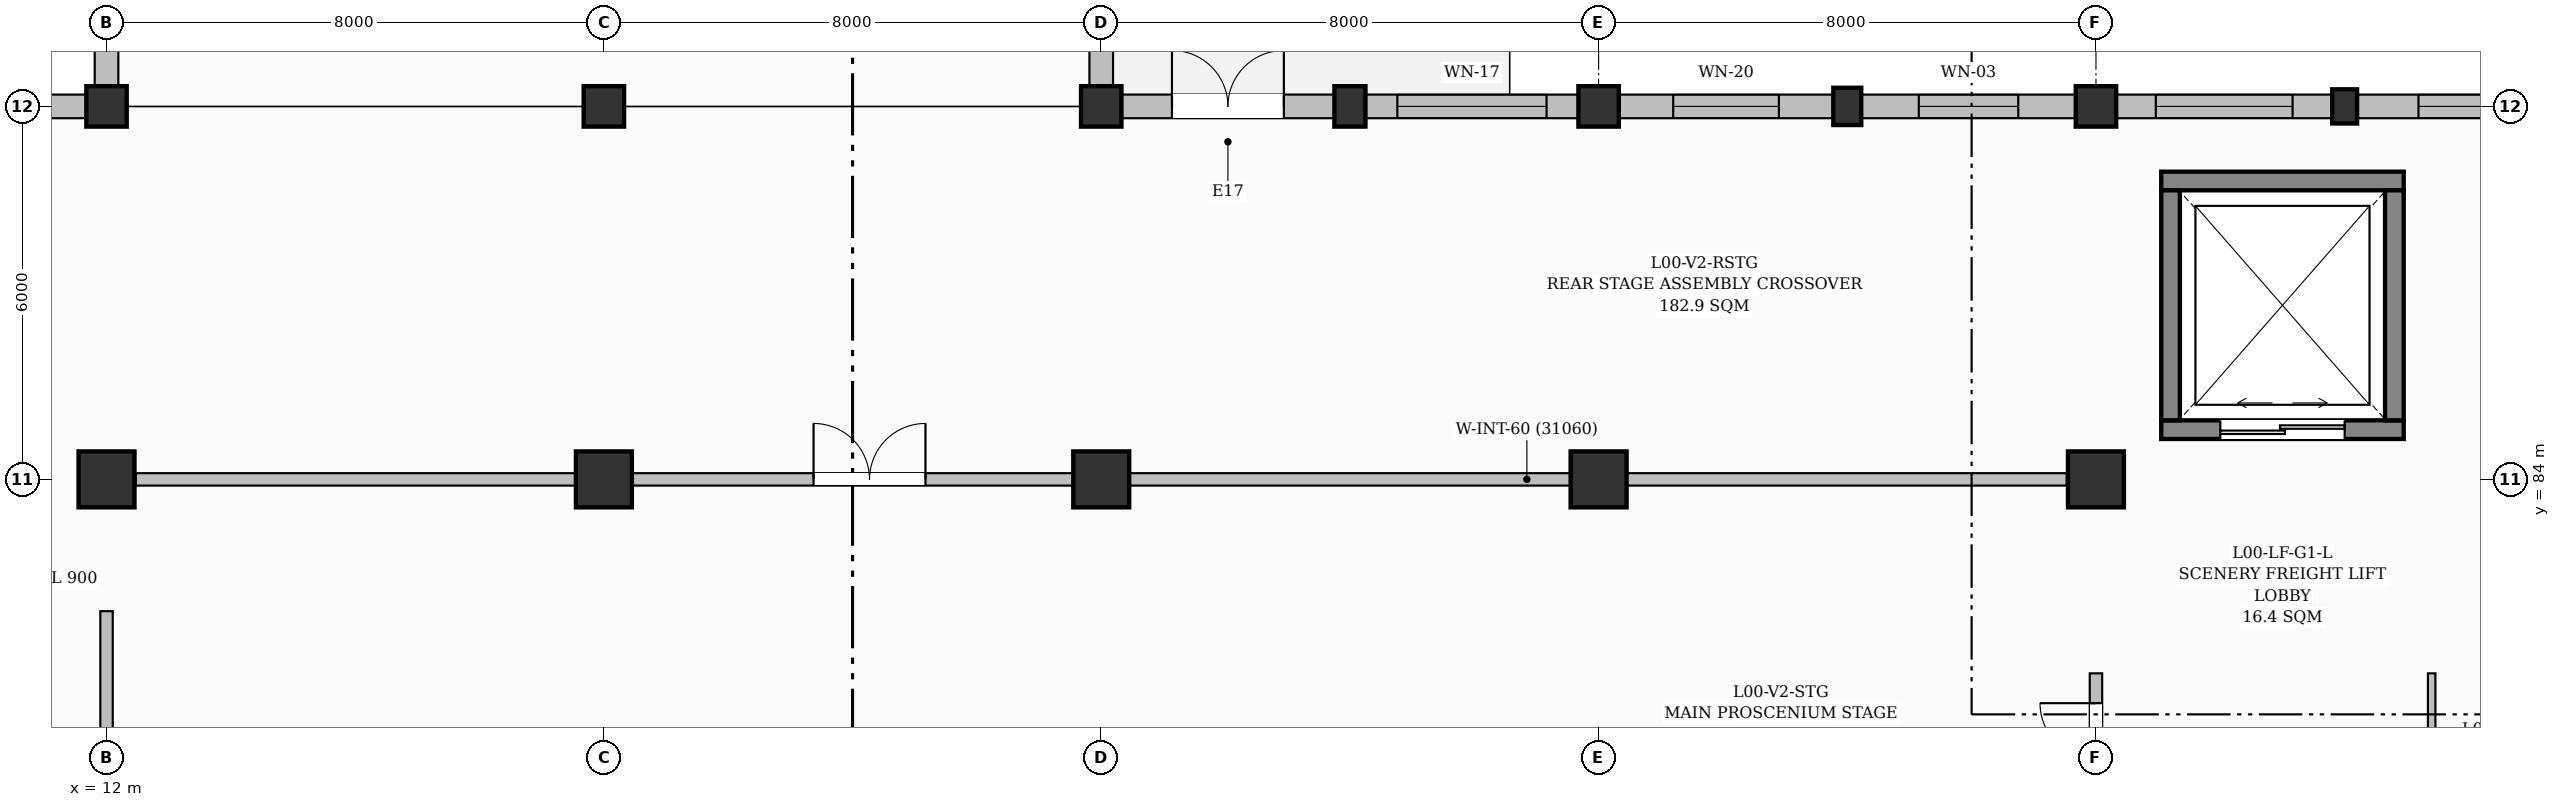
"""IFC4 building model, lengths in metres.
Left out: names, types, materials, properties, quantities, classifications, styles, units other than length and angle.
Written with IfcOpenShell. Run it as: python <this file> out.ifc"""

import sys

from ifc_helpers import new_model, si_unit, direction, frame, frame_2d, origin, origin_2d, place, context, subcontext, project, spatial, rectangle, extrude, element, fill, save


model = new_model("IFC4")
c1 = context("Model", 3, precision=1e-05, world=origin(), true_north=direction((0.0, 1.0)))
c2 = subcontext(c1, "Body", "Model", "MODEL_VIEW")
j1 = project(units=[si_unit("LENGTHUNIT", "METRE"), si_unit("PLANEANGLEUNIT", "RADIAN")], contexts=[c1])
p1 = place(None, origin())
s1 = spatial("IfcSite", under=j1, at=p1, CompositionType="ELEMENT")
p2 = place(p1, origin())
s2 = spatial("IfcBuilding", under=s1, at=p2, CompositionType="ELEMENT")
p3 = place(p2, origin())
s3 = spatial("IfcBuildingStorey", under=s2, at=p3, CompositionType="ELEMENT", Elevation=0.0)
p4 = place(p3, frame((12.0, 84.0, 0.0), z_axis=(0.0, 0.0, 1.0), x_axis=(1.0, 0.0, 0.0)))
e1 = element("IfcColumn", 1, at=p4, inside=s3, PredefinedType="COLUMN", context=c2, shape_type="SweptSolid", body=[
    extrude(rectangle(XDim=0.9, YDim=0.9, at=origin_2d()), origin(), (0.0, 0.0, 1.0), 4.8),
])
p5 = place(p3, frame((12.0, 90.0, 0.0), z_axis=(0.0, 0.0, 1.0), x_axis=(1.0, 0.0, 0.0)))
e2 = element("IfcColumn", 2, at=p5, inside=s3, PredefinedType="COLUMN", context=c2, shape_type="SweptSolid", body=[
    extrude(rectangle(XDim=0.65, YDim=0.65, at=origin_2d()), origin(), (0.0, 0.0, 1.0), 4.8),
])
p6 = place(p3, frame((20.0, 84.0, 0.0), z_axis=(0.0, 0.0, 1.0), x_axis=(1.0, 0.0, 0.0)))
e3 = element("IfcColumn", 3, at=p6, inside=s3, PredefinedType="COLUMN", context=c2, shape_type="SweptSolid", body=[
    extrude(rectangle(XDim=0.9, YDim=0.9, at=origin_2d()), origin(), (0.0, 0.0, 1.0), 4.8),
])
p7 = place(p3, frame((20.0, 90.0, 0.0), z_axis=(0.0, 0.0, 1.0), x_axis=(1.0, 0.0, 0.0)))
e4 = element("IfcColumn", 4, at=p7, inside=s3, PredefinedType="COLUMN", context=c2, shape_type="SweptSolid", body=[
    extrude(rectangle(XDim=0.65, YDim=0.65, at=origin_2d()), origin(), (0.0, 0.0, 1.0), 4.8),
])
p8 = place(p3, frame((28.0, 84.0, 0.0), z_axis=(0.0, 0.0, 1.0), x_axis=(1.0, 0.0, 0.0)))
e5 = element("IfcColumn", 5, at=p8, inside=s3, PredefinedType="COLUMN", context=c2, shape_type="SweptSolid", body=[
    extrude(rectangle(XDim=0.9, YDim=0.9, at=origin_2d()), origin(), (0.0, 0.0, 1.0), 4.8),
])
p9 = place(p3, frame((28.0, 90.0, 0.0), z_axis=(0.0, 0.0, 1.0), x_axis=(1.0, 0.0, 0.0)))
e6 = element("IfcColumn", 6, at=p9, inside=s3, PredefinedType="COLUMN", context=c2, shape_type="SweptSolid", body=[
    extrude(rectangle(XDim=0.65, YDim=0.65, at=origin_2d()), origin(), (0.0, 0.0, 1.0), 4.8),
])
p10 = place(p3, frame((32.0, 90.0, 0.0), z_axis=(0.0, 0.0, 1.0), x_axis=(1.0, 0.0, 0.0)))
e7 = element("IfcColumn", 7, at=p10, inside=s3, PredefinedType="PILASTER", context=c2, shape_type="SweptSolid", body=[
    extrude(rectangle(XDim=0.5, YDim=0.65, at=origin_2d()), origin(), (0.0, 0.0, 1.0), 4.8),
])
p11 = place(p3, frame((36.0, 84.0, 0.0), z_axis=(0.0, 0.0, 1.0), x_axis=(1.0, 0.0, 0.0)))
e8 = element("IfcColumn", 8, at=p11, inside=s3, PredefinedType="COLUMN", context=c2, shape_type="SweptSolid", body=[
    extrude(rectangle(XDim=0.9, YDim=0.9, at=origin_2d()), origin(), (0.0, 0.0, 1.0), 4.8),
])
p12 = place(p3, frame((36.0, 90.0, 0.0), z_axis=(0.0, 0.0, 1.0), x_axis=(1.0, 0.0, 0.0)))
e9 = element("IfcColumn", 9, at=p12, inside=s3, PredefinedType="COLUMN", context=c2, shape_type="SweptSolid", body=[
    extrude(rectangle(XDim=0.65, YDim=0.65, at=origin_2d()), origin(), (0.0, 0.0, 1.0), 4.8),
])
p13 = place(p3, frame((40.0, 90.0, 0.0), z_axis=(0.0, 0.0, 1.0), x_axis=(1.0, 0.0, 0.0)))
e10 = element("IfcColumn", 10, at=p13, inside=s3, PredefinedType="PILASTER", context=c2, shape_type="SweptSolid", body=[
    extrude(rectangle(XDim=0.45, YDim=0.6, at=origin_2d()), origin(), (0.0, 0.0, 1.0), 4.8),
])
p14 = place(p3, frame((44.0, 84.0, 0.0), z_axis=(0.0, 0.0, 1.0), x_axis=(1.0, 0.0, 0.0)))
e11 = element("IfcColumn", 11, at=p14, inside=s3, PredefinedType="COLUMN", context=c2, shape_type="SweptSolid", body=[
    extrude(rectangle(XDim=0.9, YDim=0.9, at=origin_2d()), origin(), (0.0, 0.0, 1.0), 4.8),
])
p15 = place(p3, frame((44.0, 90.0, 0.0), z_axis=(0.0, 0.0, 1.0), x_axis=(1.0, 0.0, 0.0)))
e12 = element("IfcColumn", 12, at=p15, inside=s3, PredefinedType="COLUMN", context=c2, shape_type="SweptSolid", body=[
    extrude(rectangle(XDim=0.65, YDim=0.65, at=origin_2d()), origin(), (0.0, 0.0, 1.0), 4.8),
])
p16 = place(p3, frame((48.0, 90.0, 0.0), z_axis=(0.0, 0.0, 1.0), x_axis=(1.0, 0.0, 0.0)))
e13 = element("IfcColumn", 13, at=p16, inside=s3, PredefinedType="PILASTER", context=c2, shape_type="SweptSolid", body=[
    extrude(rectangle(XDim=0.4, YDim=0.55, at=origin_2d()), origin(), (0.0, 0.0, 1.0), 4.8),
])
p17 = place(p3, frame((8.25, 90.0, 0.0), z_axis=(0.0, 0.0, 1.0), x_axis=(1.0, 0.0, 0.0)))
e14 = element("IfcWall", 14, at=p17, inside=s3, PredefinedType="SOLIDWALL", context=c2, shape_type="SweptSolid", body=[
    extrude(rectangle(XDim=3.425, YDim=0.38, at=frame_2d((1.712, 0.0))), origin(), (0.0, 0.0, 1.0), 4.235),
])
p18 = place(p17, frame((0.663, 0.0, 0.95)))
e15 = element("IfcOpeningElement", 15, at=p18, cuts=e14, PredefinedType="OPENING", context=c2, shape_type="SweptSolid", body=[
    extrude(rectangle(XDim=2.1, YDim=1.5, at=frame_2d((1.05, 0.75))), frame((0.0, 0.2, 0.0), z_axis=(0.0, -1.0, 0.0), x_axis=(1.0, 0.0, 0.0)), (0.0, 0.0, 1.0), 0.4),
])
p19 = place(p3, frame((28.325, 90.0, 0.0), z_axis=(0.0, 0.0, 1.0), x_axis=(1.0, 0.0, 0.0)))
e16 = element("IfcWall", 16, at=p19, inside=s3, PredefinedType="SOLIDWALL", context=c2, shape_type="SweptSolid", body=[
    extrude(rectangle(XDim=3.425, YDim=0.38, at=frame_2d((1.712, 0.0))), origin(), (0.0, 0.0, 1.0), 3.935),
])
p20 = place(p19, frame((0.812, 0.0, 0.0)))
e17 = element("IfcOpeningElement", 17, at=p20, cuts=e16, PredefinedType="OPENING", context=c2, shape_type="SweptSolid", body=[
    extrude(rectangle(XDim=1.8, YDim=2.25, at=frame_2d((0.9, 1.125))), frame((0.0, 0.2, 0.0), z_axis=(0.0, -1.0, 0.0), x_axis=(1.0, 0.0, 0.0)), (0.0, 0.0, 1.0), 0.4),
])
p21 = place(p3, frame((32.25, 90.0, 0.0), z_axis=(0.0, 0.0, 1.0), x_axis=(1.0, 0.0, 0.0)))
e18 = element("IfcWall", 18, at=p21, inside=s3, PredefinedType="SOLIDWALL", context=c2, shape_type="SweptSolid", body=[
    extrude(rectangle(XDim=3.425, YDim=0.38, at=frame_2d((1.712, 0.0))), origin(), (0.0, 0.0, 1.0), 3.935),
])
p22 = place(p21, frame((0.512, 0.0, 0.95)))
e19 = element("IfcOpeningElement", 19, at=p22, cuts=e18, PredefinedType="OPENING", context=c2, shape_type="SweptSolid", body=[
    extrude(rectangle(XDim=2.4, YDim=1.2, at=frame_2d((1.2, 0.6))), frame((0.0, 0.2, 0.0), z_axis=(0.0, -1.0, 0.0), x_axis=(1.0, 0.0, 0.0)), (0.0, 0.0, 1.0), 0.4),
])
p23 = place(p3, frame((36.325, 90.0, 0.0), z_axis=(0.0, 0.0, 1.0), x_axis=(1.0, 0.0, 0.0)))
e20 = element("IfcWall", 20, at=p23, inside=s3, PredefinedType="SOLIDWALL", context=c2, shape_type="SweptSolid", body=[
    extrude(rectangle(XDim=3.45, YDim=0.38, at=frame_2d((1.725, 0.0))), origin(), (0.0, 0.0, 1.0), 4.235),
])
p24 = place(p23, frame((0.875, 0.0, 0.95)))
e21 = element("IfcOpeningElement", 21, at=p24, cuts=e20, PredefinedType="OPENING", context=c2, shape_type="SweptSolid", body=[
    extrude(rectangle(XDim=1.7, YDim=2.0, at=frame_2d((0.85, 1.0))), frame((0.0, 0.2, 0.0), z_axis=(0.0, -1.0, 0.0), x_axis=(1.0, 0.0, 0.0)), (0.0, 0.0, 1.0), 0.4),
])
p25 = place(p3, frame((40.225, 90.0, 0.0), z_axis=(0.0, 0.0, 1.0), x_axis=(1.0, 0.0, 0.0)))
e22 = element("IfcWall", 22, at=p25, inside=s3, PredefinedType="SOLIDWALL", context=c2, shape_type="SweptSolid", body=[
    extrude(rectangle(XDim=3.45, YDim=0.38, at=frame_2d((1.725, 0.0))), origin(), (0.0, 0.0, 1.0), 4.235),
])
p26 = place(p25, frame((0.925, 0.0, 0.95)))
e23 = element("IfcOpeningElement", 23, at=p26, cuts=e22, PredefinedType="OPENING", context=c2, shape_type="SweptSolid", body=[
    extrude(rectangle(XDim=1.6, YDim=1.8, at=frame_2d((0.8, 0.9))), frame((0.0, 0.2, 0.0), z_axis=(0.0, -1.0, 0.0), x_axis=(1.0, 0.0, 0.0)), (0.0, 0.0, 1.0), 0.4),
])
p27 = place(p3, frame((44.325, 90.0, 0.0), z_axis=(0.0, 0.0, 1.0), x_axis=(1.0, 0.0, 0.0)))
e24 = element("IfcWall", 24, at=p27, inside=s3, PredefinedType="SOLIDWALL", context=c2, shape_type="SweptSolid", body=[
    extrude(rectangle(XDim=3.475, YDim=0.38, at=frame_2d((1.738, 0.0))), origin(), (0.0, 0.0, 1.0), 4.035),
])
p28 = place(p27, frame((0.637, 0.0, 0.95)))
e25 = element("IfcOpeningElement", 25, at=p28, cuts=e24, PredefinedType="OPENING", context=c2, shape_type="SweptSolid", body=[
    extrude(rectangle(XDim=2.2, YDim=1.8, at=frame_2d((1.1, 0.9))), frame((0.0, 0.2, 0.0), z_axis=(0.0, -1.0, 0.0), x_axis=(1.0, 0.0, 0.0)), (0.0, 0.0, 1.0), 0.4),
])
p29 = place(p3, frame((48.2, 90.0, 0.0), z_axis=(0.0, 0.0, 1.0), x_axis=(1.0, 0.0, 0.0)))
e26 = element("IfcWall", 26, at=p29, inside=s3, PredefinedType="SOLIDWALL", context=c2, shape_type="SweptSolid", body=[
    extrude(rectangle(XDim=3.475, YDim=0.38, at=frame_2d((1.738, 0.0))), origin(), (0.0, 0.0, 1.0), 4.035),
])
p30 = place(p29, frame((0.988, 0.0, 0.95)))
e27 = element("IfcOpeningElement", 27, at=p30, cuts=e26, PredefinedType="OPENING", context=c2, shape_type="SweptSolid", body=[
    extrude(rectangle(XDim=1.5, YDim=1.5, at=frame_2d((0.75, 0.75))), frame((0.0, 0.2, 0.0), z_axis=(0.0, -1.0, 0.0), x_axis=(1.0, 0.0, 0.0)), (0.0, 0.0, 1.0), 0.4),
])
p31 = place(p3, frame((12.0, 90.325, 0.0), z_axis=(0.0, 0.0, 1.0), x_axis=(0.0, 1.0, 0.0)))
e28 = element("IfcWall", 28, at=p31, inside=s3, PredefinedType="SOLIDWALL", context=c2, shape_type="SweptSolid", body=[
    extrude(rectangle(XDim=4.375, YDim=0.38, at=frame_2d((2.188, 0.0))), origin(), (0.0, 0.0, 1.0), 3.945),
])
p32 = place(p31, frame((1.538, 0.0, 0.95)))
e29 = element("IfcOpeningElement", 29, at=p32, cuts=e28, PredefinedType="OPENING", context=c2, shape_type="SweptSolid", body=[
    extrude(rectangle(XDim=1.3, YDim=1.4, at=frame_2d((0.65, 0.7))), frame((0.0, 0.2, 0.0), z_axis=(0.0, -1.0, 0.0), x_axis=(1.0, 0.0, 0.0)), (0.0, 0.0, 1.0), 0.4),
])
p33 = place(p3, frame((28.0, 94.7, 0.0), z_axis=(0.0, 0.0, 1.0), x_axis=(0.0, -1.0, 0.0)))
e30 = element("IfcWall", 30, at=p33, inside=s3, PredefinedType="SOLIDWALL", context=c2, shape_type="SweptSolid", body=[
    extrude(rectangle(XDim=4.375, YDim=0.38, at=frame_2d((2.188, 0.0))), origin(), (0.0, 0.0, 1.0), 3.945),
])
p34 = place(p33, frame((1.538, 0.0, 0.95)))
e31 = element("IfcOpeningElement", 31, at=p34, cuts=e30, PredefinedType="OPENING", context=c2, shape_type="SweptSolid", body=[
    extrude(rectangle(XDim=1.3, YDim=1.4, at=frame_2d((0.65, 0.7))), frame((0.0, 0.2, 0.0), z_axis=(0.0, -1.0, 0.0), x_axis=(1.0, 0.0, 0.0)), (0.0, 0.0, 1.0), 0.4),
])
p35 = place(p3, frame((45.05, 84.8, 0.0), z_axis=(0.0, 0.0, 1.0), x_axis=(1.0, 0.0, 0.0)))
e32 = element("IfcWall", 32, at=p35, inside=s3, PredefinedType="SHEAR", context=c2, shape_type="SweptSolid", body=[
    extrude(rectangle(XDim=3.9, YDim=0.3, at=frame_2d((1.95, 0.0))), origin(), (0.0, 0.0, 1.0), 4.55),
])
p36 = place(p35, frame((0.95, 0.0, 0.0)))
e33 = element("IfcOpeningElement", 33, at=p36, cuts=e32, PredefinedType="OPENING", context=c2, shape_type="SweptSolid", body=[
    extrude(rectangle(XDim=2.0, YDim=2.4, at=frame_2d((1.0, 1.2))), frame((0.0, 0.16, 0.0), z_axis=(0.0, -1.0, 0.0), x_axis=(1.0, 0.0, 0.0)), (0.0, 0.0, 1.0), 0.32),
])
p37 = place(p3, frame((48.95, 88.8, 0.0), z_axis=(0.0, 0.0, 1.0), x_axis=(-1.0, 0.0, 0.0)))
e34 = element("IfcWall", 34, at=p37, inside=s3, PredefinedType="SHEAR", context=c2, shape_type="SweptSolid", body=[
    extrude(rectangle(XDim=3.9, YDim=0.3, at=frame_2d((1.95, 0.0))), origin(), (0.0, 0.0, 1.0), 4.55),
])
for number, where, z_axis, x_axis in (
    (35, (45.2, 84.95, 0.0), (0.0, 0.0, 1.0), (0.0, 1.0, 0.0)),
    (36, (48.8, 88.65, 0.0), (0.0, 0.0, 1.0), (0.0, -1.0, 0.0)),
):
    element("IfcWall", number, at=place(p3, frame(where, z_axis=z_axis, x_axis=x_axis)), inside=s3, PredefinedType="SHEAR", context=c2, shape_type="SweptSolid", body=[
        extrude(rectangle(XDim=3.7, YDim=0.3, at=frame_2d((1.85, 0.0))), origin(), (0.0, 0.0, 1.0), 4.55),
    ])
p38 = place(p3, frame((12.47, 84.0, 0.0), z_axis=(0.0, 0.0, 1.0), x_axis=(1.0, 0.0, 0.0)))
e37 = element("IfcWall", 37, at=p38, inside=s3, PredefinedType="PARTITIONING", context=c2, shape_type="SweptSolid", body=[
    extrude(rectangle(XDim=31.06, YDim=0.2, at=frame_2d((15.53, 0.0))), origin(), (0.0, 0.0, 1.0), 3.685),
])
p39 = place(p38, frame((10.903, 0.0, 0.0)))
e38 = element("IfcOpeningElement", 38, at=p39, cuts=e37, PredefinedType="OPENING", context=c2, shape_type="SweptSolid", body=[
    extrude(rectangle(XDim=1.8, YDim=2.35, at=frame_2d((0.9, 1.175))), frame((0.0, 0.11, 0.0), z_axis=(0.0, -1.0, 0.0), x_axis=(1.0, 0.0, 0.0)), (0.0, 0.0, 1.0), 0.22),
])
p40 = place(p3, frame((12.0, 73.72, 0.0), z_axis=(0.0, 0.0, 1.0), x_axis=(0.0, 1.0, 0.0)))
e39 = element("IfcWall", 39, at=p40, inside=s3, PredefinedType="PARTITIONING", context=c2, shape_type="SweptSolid", body=[
    extrude(rectangle(XDim=8.16, YDim=0.2, at=frame_2d((4.08, 0.0))), origin(), (0.0, 0.0, 1.0), 4.145),
])
p41 = place(p40, frame((4.159, 0.0, 0.0)))
e40 = element("IfcOpeningElement", 40, at=p41, cuts=e39, PredefinedType="OPENING", context=c2, shape_type="SweptSolid", body=[
    extrude(rectangle(XDim=1.8, YDim=2.35, at=frame_2d((0.9, 1.175))), frame((0.0, 0.11, 0.0), z_axis=(0.0, -1.0, 0.0), x_axis=(1.0, 0.0, 0.0)), (0.0, 0.0, 1.0), 0.22),
])
p42 = place(p3, frame((44.0, 78.12, 0.0), z_axis=(0.0, 0.0, 1.0), x_axis=(0.0, 1.0, 0.0)))
e41 = element("IfcWall", 41, at=p42, inside=s3, PredefinedType="PARTITIONING", context=c2, shape_type="SweptSolid", body=[
    extrude(rectangle(XDim=2.76, YDim=0.2, at=frame_2d((1.38, 0.0))), origin(), (0.0, 0.0, 1.0), 3.635),
])
p43 = place(p42, frame((0.48, 0.0, 0.0)))
e42 = element("IfcOpeningElement", 42, at=p43, cuts=e41, PredefinedType="OPENING", context=c2, shape_type="SweptSolid", body=[
    extrude(rectangle(XDim=1.8, YDim=2.35, at=frame_2d((0.9, 1.175))), frame((0.0, 0.11, 0.0), z_axis=(0.0, -1.0, 0.0), x_axis=(1.0, 0.0, 0.0)), (0.0, 0.0, 1.0), 0.22),
])
p44 = place(p3, frame((49.4, 78.12, 0.0), z_axis=(0.0, 0.0, 1.0), x_axis=(0.0, 1.0, 0.0)))
e43 = element("IfcWall", 43, at=p44, inside=s3, PredefinedType="PARTITIONING", context=c2, shape_type="SweptSolid", body=[
    extrude(rectangle(XDim=2.76, YDim=0.12, at=frame_2d((1.38, 0.0))), origin(), (0.0, 0.0, 1.0), 4.55),
])
p45 = place(p20, origin())
e44 = element("IfcDoor", 44, at=p45, inside=s3, OperationType="DOUBLE_DOOR_SINGLE_SWING", PredefinedType="DOOR", context=c2, shape_type="SweptSolid", body=[
    extrude(rectangle(XDim=1.8, YDim=2.25, at=frame_2d((0.9, 1.125))), frame((0.0, 0.025, 0.0), z_axis=(0.0, -1.0, 0.0), x_axis=(1.0, 0.0, 0.0)), (0.0, 0.0, 1.0), 0.05),
])
fill(e17, e44)
p46 = place(p22, origin())
e45 = element("IfcWindow", 45, at=p46, inside=s3, PartitioningType="TRIPLE_PANEL_HORIZONTAL", PredefinedType="WINDOW", context=c2, shape_type="SweptSolid", body=[
    extrude(rectangle(XDim=2.4, YDim=1.2, at=frame_2d((1.2, 0.6))), frame((0.0, 0.03, 0.0), z_axis=(0.0, -1.0, 0.0), x_axis=(1.0, 0.0, 0.0)), (0.0, 0.0, 1.0), 0.06),
])
fill(e19, e45)
p47 = place(p24, origin())
e46 = element("IfcWindow", 46, at=p47, inside=s3, PartitioningType="DOUBLE_PANEL_VERTICAL", PredefinedType="WINDOW", context=c2, shape_type="SweptSolid", body=[
    extrude(rectangle(XDim=1.7, YDim=2.0, at=frame_2d((0.85, 1.0))), frame((0.0, 0.03, 0.0), z_axis=(0.0, -1.0, 0.0), x_axis=(1.0, 0.0, 0.0)), (0.0, 0.0, 1.0), 0.06),
])
fill(e21, e46)
p48 = place(p26, origin())
e47 = element("IfcWindow", 47, at=p48, inside=s3, PartitioningType="DOUBLE_PANEL_VERTICAL", PredefinedType="WINDOW", context=c2, shape_type="SweptSolid", body=[
    extrude(rectangle(XDim=1.6, YDim=1.8, at=frame_2d((0.8, 0.9))), frame((0.0, 0.03, 0.0), z_axis=(0.0, -1.0, 0.0), x_axis=(1.0, 0.0, 0.0)), (0.0, 0.0, 1.0), 0.06),
])
fill(e23, e47)
p49 = place(p28, origin())
e48 = element("IfcWindow", 48, at=p49, inside=s3, PartitioningType="TRIPLE_PANEL_VERTICAL", PredefinedType="WINDOW", context=c2, shape_type="SweptSolid", body=[
    extrude(rectangle(XDim=2.2, YDim=1.8, at=frame_2d((1.1, 0.9))), frame((0.0, 0.03, 0.0), z_axis=(0.0, -1.0, 0.0), x_axis=(1.0, 0.0, 0.0)), (0.0, 0.0, 1.0), 0.06),
])
fill(e25, e48)
p50 = place(p30, origin())
e49 = element("IfcWindow", 49, at=p50, inside=s3, PartitioningType="DOUBLE_PANEL_VERTICAL", PredefinedType="WINDOW", context=c2, shape_type="SweptSolid", body=[
    extrude(rectangle(XDim=1.5, YDim=1.5, at=frame_2d((0.75, 0.75))), frame((0.0, 0.03, 0.0), z_axis=(0.0, -1.0, 0.0), x_axis=(1.0, 0.0, 0.0)), (0.0, 0.0, 1.0), 0.06),
])
fill(e27, e49)
p51 = place(p36, origin())
e50 = element("IfcDoor", 50, at=p51, inside=s3, OperationType="DOUBLE_DOOR_SLIDING", PredefinedType="DOOR", context=c2, shape_type="SweptSolid", body=[
    extrude(rectangle(XDim=2.0, YDim=2.4, at=frame_2d((1.0, 1.2))), frame((0.0, 0.025, 0.0), z_axis=(0.0, -1.0, 0.0), x_axis=(1.0, 0.0, 0.0)), (0.0, 0.0, 1.0), 0.05),
])
fill(e33, e50)
p52 = place(p39, origin())
e51 = element("IfcDoor", 51, at=p52, inside=s3, OperationType="DOUBLE_DOOR_SINGLE_SWING", PredefinedType="DOOR", context=c2, shape_type="SweptSolid", body=[
    extrude(rectangle(XDim=1.8, YDim=2.35, at=frame_2d((0.9, 1.175))), frame((0.0, 0.025, 0.0), z_axis=(0.0, -1.0, 0.0), x_axis=(1.0, 0.0, 0.0)), (0.0, 0.0, 1.0), 0.05),
])
fill(e38, e51)
p53 = place(p43, origin())
e52 = element("IfcDoor", 52, at=p53, inside=s3, OperationType="DOUBLE_DOOR_SINGLE_SWING", PredefinedType="DOOR", context=c2, shape_type="SweptSolid", body=[
    extrude(rectangle(XDim=1.8, YDim=2.35, at=frame_2d((0.9, 1.175))), frame((0.0, 0.025, 0.0), z_axis=(0.0, -1.0, 0.0), x_axis=(1.0, 0.0, 0.0)), (0.0, 0.0, 1.0), 0.05),
])
fill(e42, e52)
save(model, sys.argv[1])
